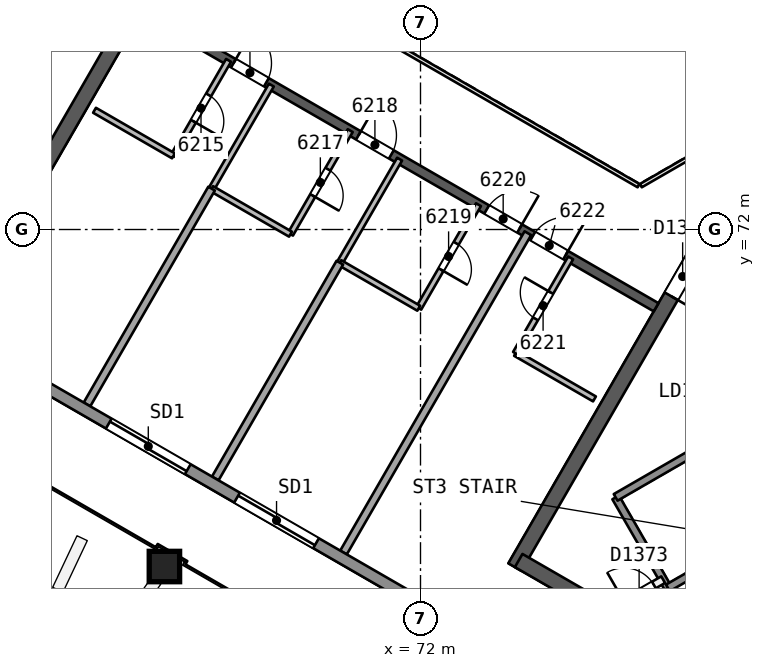
"""IFC4 building model, lengths in metres.
Left out: names, types, materials, properties, quantities, classifications, styles, units other than length and angle.
Written with IfcOpenShell. Run it as: python <this file> out.ifc"""

import sys

from ifc_helpers import new_model, si_unit, direction, frame, frame_2d, origin, origin_2d, place, context, subcontext, project, spatial, rectangle, extrude, element, fill, save


model = new_model("IFC4")
c1 = context("Model", 3, precision=1e-05, world=origin(), true_north=direction((0.0, 1.0)))
c2 = subcontext(c1, "Body", "Model", "MODEL_VIEW")
j1 = project(units=[si_unit("LENGTHUNIT", "METRE"), si_unit("PLANEANGLEUNIT", "RADIAN")], contexts=[c1])
p1 = place(None, origin())
s1 = spatial("IfcSite", under=j1, at=p1, CompositionType="ELEMENT")
p2 = place(p1, origin())
s2 = spatial("IfcBuilding", under=s1, at=p2, CompositionType="ELEMENT")
p3 = place(p2, frame((0.0, 0.0, 255.3)))
s3 = spatial("IfcBuildingStorey", under=s2, at=p3, CompositionType="ELEMENT", Elevation=255.3)
p4 = place(p3, frame((60.737, 71.284, 0.0), z_axis=(0.0, 0.0, 1.0), x_axis=(0.50000547566, 0.866022242388, 0.0)))
e1 = element("IfcWall", 1, at=p4, inside=s3, PredefinedType="SHEAR", context=c2, shape_type="SweptSolid", body=[
    extrude(rectangle(XDim=10.18, YDim=0.4, at=frame_2d((5.09, 0.0))), origin(), (0.0, 0.0, 1.0), 3.7),
])
p5 = place(p4, frame((8.03, 0.0, 0.0)))
e2 = element("IfcOpeningElement", 2, at=p5, cuts=e1, PredefinedType="OPENING", context=c2, shape_type="SweptSolid", body=[
    extrude(rectangle(XDim=1.2, YDim=2.1, at=frame_2d((0.6, 1.05))), frame((0.0, 0.21, 0.0), z_axis=(0.0, -1.0, 0.0), x_axis=(1.0, 0.0, 0.0)), (0.0, 0.0, 1.0), 0.421),
])
p6 = place(p3, frame((79.615, 72.006, 0.0), z_axis=(0.0, 0.0, 1.0), x_axis=(-0.50000177223, -0.866024380585, 0.0)))
e3 = element("IfcWall", 3, at=p6, inside=s3, PredefinedType="SHEAR", context=c2, shape_type="SweptSolid", body=[
    extrude(rectangle(XDim=10.265, YDim=0.4, at=frame_2d((5.132, 0.0))), origin(), (0.0, 0.0, 1.0), 3.7),
])
p7 = place(p6, frame((0.834, 0.0, 0.0)))
e4 = element("IfcOpeningElement", 4, at=p7, cuts=e3, PredefinedType="OPENING", context=c2, shape_type="SweptSolid", body=[
    extrude(rectangle(XDim=1.2, YDim=2.1, at=frame_2d((0.6, 1.05))), frame((0.0, 0.21, 0.0), z_axis=(0.0, -1.0, 0.0), x_axis=(1.0, 0.0, 0.0)), (0.0, 0.0, 1.0), 0.421),
])
p8 = place(p3, frame((74.583, 63.29, 0.0), z_axis=(0.0, 0.0, 1.0), x_axis=(0.866024494188, -0.500001575463, 0.0)))
e5 = element("IfcWall", 5, at=p8, inside=s3, PredefinedType="SHEAR", context=c2, shape_type="SweptSolid", body=[
    extrude(rectangle(XDim=14.133, YDim=0.4, at=frame_2d((7.067, 0.0))), origin(), (0.0, 0.0, 1.0), 3.7),
])
p9 = place(p3, frame((64.7, 77.748, 0.0), z_axis=(0.0, 0.0, 1.0), x_axis=(0.866026492143, -0.499998114903, 0.0)))
e6 = element("IfcWall", 6, at=p9, inside=s3, PredefinedType="SHEAR", context=c2, shape_type="SweptSolid", body=[
    extrude(rectangle(XDim=15.588, YDim=0.25, at=frame_2d((7.794, 0.0))), origin(), (0.0, 0.0, 1.0), 3.3),
])
p10 = place(p9, frame((2.747, 0.0, 0.0)))
e7 = element("IfcOpeningElement", 7, at=p10, cuts=e6, PredefinedType="OPENING", context=c2, shape_type="SweptSolid", body=[
    extrude(rectangle(XDim=1.0, YDim=2.1, at=frame_2d((0.5, 1.05))), frame((0.0, 0.135, 0.0), z_axis=(0.0, -1.0, 0.0), x_axis=(1.0, 0.0, 0.0)), (0.0, 0.0, 1.0), 0.271),
])
p11 = place(p9, frame((6.544, 0.0, 0.0)))
e8 = element("IfcOpeningElement", 8, at=p11, cuts=e6, PredefinedType="OPENING", context=c2, shape_type="SweptSolid", body=[
    extrude(rectangle(XDim=1.0, YDim=2.1, at=frame_2d((0.5, 1.05))), frame((0.0, 0.135, 0.0), z_axis=(0.0, -1.0, 0.0), x_axis=(1.0, 0.0, 0.0)), (0.0, 0.0, 1.0), 0.271),
])
p12 = place(p9, frame((10.441, 0.0, 0.0)))
e9 = element("IfcOpeningElement", 9, at=p12, cuts=e6, PredefinedType="OPENING", context=c2, shape_type="SweptSolid", body=[
    extrude(rectangle(XDim=1.0, YDim=2.1, at=frame_2d((0.5, 1.05))), frame((0.0, 0.135, 0.0), z_axis=(0.0, -1.0, 0.0), x_axis=(1.0, 0.0, 0.0)), (0.0, 0.0, 1.0), 0.271),
])
p13 = place(p9, frame((11.841, 0.0, 0.0)))
e10 = element("IfcOpeningElement", 10, at=p13, cuts=e6, PredefinedType="OPENING", context=c2, shape_type="SweptSolid", body=[
    extrude(rectangle(XDim=1.0, YDim=2.1, at=frame_2d((0.5, 1.05))), frame((0.0, 0.135, 0.0), z_axis=(0.0, -1.0, 0.0), x_axis=(1.0, 0.0, 0.0)), (0.0, 0.0, 1.0), 0.271),
])
p14 = place(p3, frame((65.249, 63.111, 0.0), z_axis=(0.010093620709, 0.017482414954, 0.999796221231), x_axis=(-0.499912926478, -0.865840372083, 0.020187025823)))
e11 = element("IfcColumn", 11, at=p14, inside=s3, PredefinedType="COLUMN", context=c2, shape_type="SweptSolid", body=[
    extrude(rectangle(XDim=0.8, YDim=0.8, at=origin_2d()), origin(), (0.0, 0.0, 1.0), 3.701),
])
p15 = place(p3, frame((66.949, 76.45, 0.0), z_axis=(0.0, 0.0, 1.0), x_axis=(-0.499987231761, -0.866032775405, 0.0)))
e12 = element("IfcWall", 12, at=p15, inside=s3, PredefinedType="PARTITIONING", context=c2, shape_type="SweptSolid", body=[
    extrude(rectangle(XDim=2.9, YDim=0.15, at=frame_2d((1.45, 0.0))), origin(), (0.0, 0.0, 1.0), 3.3),
])
p16 = place(p15, frame((1.05, 0.0, 0.0)))
e13 = element("IfcOpeningElement", 13, at=p16, cuts=e12, PredefinedType="OPENING", context=c2, shape_type="SweptSolid", body=[
    extrude(rectangle(XDim=0.8, YDim=2.1, at=frame_2d((0.4, 1.05))), frame((0.0, 0.085, 0.0), z_axis=(0.0, -1.0, 0.0), x_axis=(1.0, 0.0, 0.0)), (0.0, 0.0, 1.0), 0.171),
])
p17 = place(p3, frame((65.499, 73.938, 0.0), z_axis=(0.0, 0.0, 1.0), x_axis=(-0.866004188936, 0.500036743394, 0.0)))
e14 = element("IfcWall", 14, at=p17, inside=s3, PredefinedType="PARTITIONING", context=c2, shape_type="SweptSolid", body=[
    extrude(rectangle(XDim=2.398, YDim=0.15, at=frame_2d((1.199, 0.0))), origin(), (0.0, 0.0, 1.0), 3.3),
])
p18 = place(p3, frame((63.224, 67.397, 0.0), z_axis=(0.0, 0.0, 1.0), x_axis=(0.499983526171, 0.866034914745, 0.0)))
e15 = element("IfcWall", 15, at=p18, inside=s3, PredefinedType="PARTITIONING", context=c2, shape_type="SweptSolid", body=[
    extrude(rectangle(XDim=6.557, YDim=0.2, at=frame_2d((3.278, 0.0))), origin(), (0.0, 0.0, 1.0), 3.3),
])
p19 = place(p3, frame((66.502, 73.076, 0.0), z_axis=(0.0, 0.0, 1.0), x_axis=(0.499995674689, 0.86602790099, 0.0)))
e16 = element("IfcWall", 16, at=p19, inside=s3, PredefinedType="PARTITIONING", context=c2, shape_type="SweptSolid", body=[
    extrude(rectangle(XDim=3.146, YDim=0.15, at=frame_2d((1.573, 0.0))), origin(), (0.0, 0.0, 1.0), 3.3),
])
p20 = place(p3, frame((70.151, 74.601, 0.0), z_axis=(0.0, 0.0, 1.0), x_axis=(-0.499995674689, -0.86602790099, 0.0)))
e17 = element("IfcWall", 17, at=p20, inside=s3, PredefinedType="PARTITIONING", context=c2, shape_type="SweptSolid", body=[
    extrude(rectangle(XDim=3.146, YDim=0.15, at=frame_2d((1.573, 0.0))), origin(), (0.0, 0.0, 1.0), 3.3),
])
p21 = place(p20, frame((1.173, 0.0, 0.0)))
e18 = element("IfcOpeningElement", 18, at=p21, cuts=e17, PredefinedType="OPENING", context=c2, shape_type="SweptSolid", body=[
    extrude(rectangle(XDim=0.8, YDim=2.1, at=frame_2d((0.4, 1.05))), frame((0.0, 0.085, 0.0), z_axis=(0.0, -1.0, 0.0), x_axis=(1.0, 0.0, 0.0)), (0.0, 0.0, 1.0), 0.171),
])
p22 = place(p3, frame((68.578, 71.877, 0.0), z_axis=(0.0, 0.0, 1.0), x_axis=(-0.866034636017, 0.499984008963, 0.0)))
e19 = element("IfcWall", 19, at=p22, inside=s3, PredefinedType="PARTITIONING", context=c2, shape_type="SweptSolid", body=[
    extrude(rectangle(XDim=2.397, YDim=0.15, at=frame_2d((1.198, 0.0))), origin(), (0.0, 0.0, 1.0), 3.3),
])
p23 = place(p3, frame((66.599, 65.449, 0.0), z_axis=(0.0, 0.0, 1.0), x_axis=(0.499983526171, 0.866034914745, 0.0)))
e20 = element("IfcWall", 20, at=p23, inside=s3, PredefinedType="PARTITIONING", context=c2, shape_type="SweptSolid", body=[
    extrude(rectangle(XDim=6.557, YDim=0.2, at=frame_2d((3.278, 0.0))), origin(), (0.0, 0.0, 1.0), 3.3),
])
p24 = place(p3, frame((69.877, 71.127, 0.0), z_axis=(0.0, 0.0, 1.0), x_axis=(0.499995674689, 0.86602790099, 0.0)))
e21 = element("IfcWall", 21, at=p24, inside=s3, PredefinedType="PARTITIONING", context=c2, shape_type="SweptSolid", body=[
    extrude(rectangle(XDim=3.146, YDim=0.15, at=frame_2d((1.573, 0.0))), origin(), (0.0, 0.0, 1.0), 3.3),
])
p25 = place(p3, frame((73.526, 72.653, 0.0), z_axis=(0.0, 0.0, 1.0), x_axis=(-0.500029284648, -0.866008495625, 0.0)))
e22 = element("IfcWall", 22, at=p25, inside=s3, PredefinedType="PARTITIONING", context=c2, shape_type="SweptSolid", body=[
    extrude(rectangle(XDim=3.145, YDim=0.15, at=frame_2d((1.573, 0.0))), origin(), (0.0, 0.0, 1.0), 3.3),
])
p26 = place(p25, frame((1.173, 0.0, 0.0)))
e23 = element("IfcOpeningElement", 23, at=p26, cuts=e22, PredefinedType="OPENING", context=c2, shape_type="SweptSolid", body=[
    extrude(rectangle(XDim=0.8, YDim=2.1, at=frame_2d((0.4, 1.05))), frame((0.0, 0.085, 0.0), z_axis=(0.0, -1.0, 0.0), x_axis=(1.0, 0.0, 0.0)), (0.0, 0.0, 1.0), 0.171),
])
p27 = place(p3, frame((71.953, 69.929, 0.0), z_axis=(0.0, 0.0, 1.0), x_axis=(-0.866034636017, 0.499984008963, 0.0)))
e24 = element("IfcWall", 24, at=p27, inside=s3, PredefinedType="PARTITIONING", context=c2, shape_type="SweptSolid", body=[
    extrude(rectangle(XDim=2.397, YDim=0.15, at=frame_2d((1.198, 0.0))), origin(), (0.0, 0.0, 1.0), 3.3),
])
p28 = place(p3, frame((69.974, 63.5, 0.0), z_axis=(0.0, 0.0, 1.0), x_axis=(0.499987464755, 0.86603264089, 0.0)))
e25 = element("IfcWall", 25, at=p28, inside=s3, PredefinedType="PARTITIONING", context=c2, shape_type="SweptSolid", body=[
    extrude(rectangle(XDim=9.702, YDim=0.2, at=frame_2d((4.851, 0.0))), origin(), (0.0, 0.0, 1.0), 3.3),
])
p29 = place(p3, frame((76.578, 67.542, 0.0), z_axis=(0.0, 0.0, 1.0), x_axis=(-0.866048270239, 0.499960392047, 0.0)))
e26 = element("IfcWall", 26, at=p29, inside=s3, PredefinedType="PARTITIONING", context=c2, shape_type="SweptSolid", body=[
    extrude(rectangle(XDim=2.398, YDim=0.15, at=frame_2d((1.199, 0.0))), origin(), (0.0, 0.0, 1.0), 3.3),
])
p30 = place(p3, frame((74.501, 68.741, 0.0), z_axis=(0.0, 0.0, 1.0), x_axis=(0.50005036918, 0.865996321171, 0.0)))
e27 = element("IfcWall", 27, at=p30, inside=s3, PredefinedType="PARTITIONING", context=c2, shape_type="SweptSolid", body=[
    extrude(rectangle(XDim=2.9, YDim=0.15, at=frame_2d((1.45, 0.0))), origin(), (0.0, 0.0, 1.0), 3.3),
])
p31 = place(p30, frame((1.05, 0.0, 0.0)))
e28 = element("IfcOpeningElement", 28, at=p31, cuts=e27, PredefinedType="OPENING", context=c2, shape_type="SweptSolid", body=[
    extrude(rectangle(XDim=0.8, YDim=2.1, at=frame_2d((0.4, 1.05))), frame((0.0, 0.085, 0.0), z_axis=(0.0, -1.0, 0.0), x_axis=(1.0, 0.0, 0.0)), (0.0, 0.0, 1.0), 0.171),
])
p32 = place(p3, frame((87.633, 53.133, 0.0), z_axis=(0.0, 0.0, 1.0), x_axis=(-0.866025373204, 0.500000052967, 0.0)))
e29 = element("IfcWall", 29, at=p32, inside=s3, PredefinedType="SOLIDWALL", context=c2, shape_type="SweptSolid", body=[
    extrude(rectangle(XDim=48.748, YDim=0.3, at=frame_2d((24.374, 0.0))), origin(), (0.0, 0.0, 1.0), 3.3),
])
p33 = place(p32, frame((37.353, 0.0, 0.0)))
e30 = element("IfcOpeningElement", 30, at=p33, cuts=e29, PredefinedType="OPENING", context=c2, shape_type="SweptSolid", body=[
    extrude(rectangle(XDim=2.4, YDim=2.4, at=frame_2d((1.2, 1.2))), frame((0.0, 0.161, 0.0), z_axis=(0.0, -1.0, 0.0), x_axis=(1.0, 0.0, 0.0)), (0.0, 0.0, 1.0), 0.321),
])
p34 = place(p32, frame((8.995, 0.0, 0.0)))
e31 = element("IfcOpeningElement", 31, at=p34, cuts=e29, PredefinedType="OPENING", context=c2, shape_type="SweptSolid", body=[
    extrude(rectangle(XDim=2.4, YDim=2.4, at=frame_2d((1.2, 1.2))), frame((0.0, 0.161, 0.0), z_axis=(0.0, -1.0, 0.0), x_axis=(1.0, 0.0, 0.0)), (0.0, 0.0, 1.0), 0.321),
])
p35 = place(p32, frame((25.123, 0.0, 0.0)))
e32 = element("IfcOpeningElement", 32, at=p35, cuts=e29, PredefinedType="OPENING", context=c2, shape_type="SweptSolid", body=[
    extrude(rectangle(XDim=2.4, YDim=2.4, at=frame_2d((1.2, 1.2))), frame((0.0, 0.161, 0.0), z_axis=(0.0, -1.0, 0.0), x_axis=(1.0, 0.0, 0.0)), (0.0, 0.0, 1.0), 0.321),
])
p36 = place(p32, frame((21.226, 0.0, 0.0)))
e33 = element("IfcOpeningElement", 33, at=p36, cuts=e29, PredefinedType="OPENING", context=c2, shape_type="SweptSolid", body=[
    extrude(rectangle(XDim=2.4, YDim=2.4, at=frame_2d((1.2, 1.2))), frame((0.0, 0.161, 0.0), z_axis=(0.0, -1.0, 0.0), x_axis=(1.0, 0.0, 0.0)), (0.0, 0.0, 1.0), 0.321),
])
p37 = place(p3, frame((77.135, 64.952, 0.0), z_axis=(0.0, 0.0, 1.0), x_axis=(0.499996545922, -0.866027397988, 0.0)))
e34 = element("IfcWall", 34, at=p37, inside=s3, PredefinedType="SOLIDWALL", context=c2, shape_type="SweptSolid", body=[
    extrude(rectangle(XDim=2.75, YDim=0.2, at=frame_2d((1.375, 0.0))), origin(), (0.0, 0.0, 1.0), 3.3),
])
p38 = place(p3, frame((77.135, 64.952, 0.0), z_axis=(0.0, 0.0, 1.0), x_axis=(0.866031916153, 0.499988720078, 0.0)))
e35 = element("IfcWall", 35, at=p38, inside=s3, PredefinedType="SOLIDWALL", context=c2, shape_type="SweptSolid", body=[
    extrude(rectangle(XDim=11.35, YDim=0.2, at=frame_2d((5.675, 0.0))), origin(), (0.0, 0.0, 1.0), 3.3),
])
p39 = place(p38, frame((2.875, 0.0, 0.0)))
e36 = element("IfcOpeningElement", 36, at=p39, cuts=e35, PredefinedType="OPENING", context=c2, shape_type="SweptSolid", body=[
    extrude(rectangle(XDim=1.1, YDim=2.1, at=frame_2d((0.55, 1.05))), frame((0.0, 0.11, 0.0), z_axis=(0.0, -1.0, 0.0), x_axis=(1.0, 0.0, 0.0)), (0.0, 0.0, 1.0), 0.221),
])
p40 = place(p38, frame((5.125, 0.0, 0.0)))
e37 = element("IfcOpeningElement", 37, at=p40, cuts=e35, PredefinedType="OPENING", context=c2, shape_type="SweptSolid", body=[
    extrude(rectangle(XDim=1.1, YDim=2.1, at=frame_2d((0.55, 1.05))), frame((0.0, 0.11, 0.0), z_axis=(0.0, -1.0, 0.0), x_axis=(1.0, 0.0, 0.0)), (0.0, 0.0, 1.0), 0.221),
])
p41 = place(p38, frame((7.375, 0.0, 0.0)))
e38 = element("IfcOpeningElement", 38, at=p41, cuts=e35, PredefinedType="OPENING", context=c2, shape_type="SweptSolid", body=[
    extrude(rectangle(XDim=1.1, YDim=2.1, at=frame_2d((0.55, 1.05))), frame((0.0, 0.11, 0.0), z_axis=(0.0, -1.0, 0.0), x_axis=(1.0, 0.0, 0.0)), (0.0, 0.0, 1.0), 0.221),
])
p42 = place(p3, frame((77.12, 62.056, 0.0), z_axis=(0.0, 0.0, 1.0), x_axis=(0.866054810376, 0.49994906283, 0.0)))
e39 = element("IfcWall", 39, at=p42, inside=s3, PredefinedType="PARTITIONING", context=c2, shape_type="SweptSolid", body=[
    extrude(rectangle(XDim=1.461, YDim=0.2, at=frame_2d((0.73, 0.0))), origin(), (0.0, 0.0, 1.0), 3.3),
])
p43 = place(p42, frame((0.281, 0.0, 0.0)))
e40 = element("IfcOpeningElement", 40, at=p43, cuts=e39, PredefinedType="OPENING", context=c2, shape_type="SweptSolid", body=[
    extrude(rectangle(XDim=0.9, YDim=2.1, at=frame_2d((0.45, 1.05))), frame((0.0, 0.11, 0.0), z_axis=(0.0, -1.0, 0.0), x_axis=(1.0, 0.0, 0.0)), (0.0, 0.0, 1.0), 0.221),
])
p44 = place(p3, frame((78.51, 62.57, 0.0), z_axis=(0.0, 0.0, 1.0), x_axis=(0.866053019151, 0.499952165731, 0.0)))
e41 = element("IfcWall", 41, at=p44, inside=s3, PredefinedType="SOLIDWALL", context=c2, shape_type="SweptSolid", body=[
    extrude(rectangle(XDim=2.3, YDim=0.2, at=frame_2d((1.15, 0.0))), origin(), (0.0, 0.0, 1.0), 3.3),
])
p45 = place(p3, frame((67.702, 78.948, 0.0), z_axis=(0.0, 0.0, 1.0), x_axis=(0.866026658274, -0.499997827154, 0.0)))
e42 = element("IfcWall", 42, at=p45, inside=s3, PredefinedType="PARTITIONING", context=c2, shape_type="SweptSolid", body=[
    extrude(rectangle(XDim=11.588, YDim=0.1, at=frame_2d((5.794, 0.0))), origin(), (0.0, 0.0, 1.0), 3.3),
])
p46 = place(p3, frame((77.798, 73.154, 0.0), z_axis=(0.0, 0.0, 1.0), x_axis=(0.866041268327, 0.499972520799, 0.0)))
e43 = element("IfcWall", 43, at=p46, inside=s3, PredefinedType="PARTITIONING", context=c2, shape_type="SweptSolid", body=[
    extrude(rectangle(XDim=2.0, YDim=0.1, at=frame_2d((1.0, 0.0))), origin(), (0.0, 0.0, 1.0), 3.3),
])
p47 = place(p16, origin())
e44 = element("IfcDoor", 44, at=p47, inside=s3, OperationType="SINGLE_SWING_RIGHT", PredefinedType="NOTDEFINED", context=c2, shape_type="SweptSolid", body=[
    extrude(rectangle(XDim=0.8, YDim=2.1, at=frame_2d((0.4, 1.05))), frame((0.0, 0.025, 0.0), z_axis=(0.0, -1.0, 0.0), x_axis=(1.0, 0.0, 0.0)), (0.0, 0.0, 1.0), 0.05),
])
fill(e13, e44)
p48 = place(p10, origin())
e45 = element("IfcDoor", 45, at=p48, inside=s3, OperationType="SINGLE_SWING_LEFT", PredefinedType="NOTDEFINED", context=c2, shape_type="SweptSolid", body=[
    extrude(rectangle(XDim=1.0, YDim=2.1, at=frame_2d((0.5, 1.05))), frame((0.0, 0.025, 0.0), z_axis=(0.0, -1.0, 0.0), x_axis=(1.0, 0.0, 0.0)), (0.0, 0.0, 1.0), 0.05),
])
fill(e7, e45)
p49 = place(p21, origin())
e46 = element("IfcDoor", 46, at=p49, inside=s3, OperationType="SINGLE_SWING_RIGHT", PredefinedType="NOTDEFINED", context=c2, shape_type="SweptSolid", body=[
    extrude(rectangle(XDim=0.8, YDim=2.1, at=frame_2d((0.4, 1.05))), frame((0.0, 0.025, 0.0), z_axis=(0.0, -1.0, 0.0), x_axis=(1.0, 0.0, 0.0)), (0.0, 0.0, 1.0), 0.05),
])
fill(e18, e46)
p50 = place(p11, origin())
e47 = element("IfcDoor", 47, at=p50, inside=s3, OperationType="SINGLE_SWING_LEFT", PredefinedType="NOTDEFINED", context=c2, shape_type="SweptSolid", body=[
    extrude(rectangle(XDim=1.0, YDim=2.1, at=frame_2d((0.5, 1.05))), frame((0.0, 0.025, 0.0), z_axis=(0.0, -1.0, 0.0), x_axis=(1.0, 0.0, 0.0)), (0.0, 0.0, 1.0), 0.05),
])
fill(e8, e47)
p51 = place(p26, origin())
e48 = element("IfcDoor", 48, at=p51, inside=s3, OperationType="SINGLE_SWING_RIGHT", PredefinedType="NOTDEFINED", context=c2, shape_type="SweptSolid", body=[
    extrude(rectangle(XDim=0.8, YDim=2.1, at=frame_2d((0.4, 1.05))), frame((0.0, 0.025, 0.0), z_axis=(0.0, -1.0, 0.0), x_axis=(1.0, 0.0, 0.0)), (0.0, 0.0, 1.0), 0.05),
])
fill(e23, e48)
p52 = place(p12, origin())
e49 = element("IfcDoor", 49, at=p52, inside=s3, OperationType="SINGLE_SWING_RIGHT", PredefinedType="NOTDEFINED", context=c2, shape_type="SweptSolid", body=[
    extrude(rectangle(XDim=1.0, YDim=2.1, at=frame_2d((0.5, 1.05))), frame((0.0, 0.025, 0.0), z_axis=(0.0, -1.0, 0.0), x_axis=(1.0, 0.0, 0.0)), (0.0, 0.0, 1.0), 0.05),
])
fill(e9, e49)
p53 = place(p31, origin())
e50 = element("IfcDoor", 50, at=p53, inside=s3, OperationType="SINGLE_SWING_RIGHT", PredefinedType="NOTDEFINED", context=c2, shape_type="SweptSolid", body=[
    extrude(rectangle(XDim=0.8, YDim=2.1, at=frame_2d((0.4, 1.05))), frame((0.0, 0.025, 0.0), z_axis=(0.0, -1.0, 0.0), x_axis=(1.0, 0.0, 0.0)), (0.0, 0.0, 1.0), 0.05),
])
fill(e28, e50)
p54 = place(p13, origin())
e51 = element("IfcDoor", 51, at=p54, inside=s3, OperationType="SINGLE_SWING_RIGHT", PredefinedType="NOTDEFINED", context=c2, shape_type="SweptSolid", body=[
    extrude(rectangle(XDim=1.0, YDim=2.1, at=frame_2d((0.5, 1.05))), frame((0.0, 0.025, 0.0), z_axis=(0.0, -1.0, 0.0), x_axis=(1.0, 0.0, 0.0)), (0.0, 0.0, 1.0), 0.05),
])
fill(e10, e51)
p55 = place(p35, origin())
e52 = element("IfcDoor", 52, at=p55, inside=s3, OperationType="SLIDING_TO_LEFT", PredefinedType="NOTDEFINED", context=c2, shape_type="SweptSolid", body=[
    extrude(rectangle(XDim=2.4, YDim=2.4, at=frame_2d((1.2, 1.2))), frame((0.0, 0.025, 0.0), z_axis=(0.0, -1.0, 0.0), x_axis=(1.0, 0.0, 0.0)), (0.0, 0.0, 1.0), 0.05),
])
fill(e32, e52)
p56 = place(p36, origin())
e53 = element("IfcDoor", 53, at=p56, inside=s3, OperationType="SLIDING_TO_RIGHT", PredefinedType="NOTDEFINED", context=c2, shape_type="SweptSolid", body=[
    extrude(rectangle(XDim=2.4, YDim=2.4, at=frame_2d((1.2, 1.2))), frame((0.0, 0.025, 0.0), z_axis=(0.0, -1.0, 0.0), x_axis=(1.0, 0.0, 0.0)), (0.0, 0.0, 1.0), 0.05),
])
fill(e33, e53)
p57 = place(p7, origin())
e54 = element("IfcDoor", 54, at=p57, inside=s3, OperationType="SINGLE_SWING_RIGHT", PredefinedType="NOTDEFINED", context=c2, shape_type="SweptSolid", body=[
    extrude(rectangle(XDim=1.2, YDim=2.1, at=frame_2d((0.6, 1.05))), frame((0.0, 0.025, 0.0), z_axis=(0.0, -1.0, 0.0), x_axis=(1.0, 0.0, 0.0)), (0.0, 0.0, 1.0), 0.05),
])
fill(e4, e54)
p58 = place(p43, origin())
e55 = element("IfcDoor", 55, at=p58, inside=s3, OperationType="SINGLE_SWING_LEFT", PredefinedType="NOTDEFINED", context=c2, shape_type="SweptSolid", body=[
    extrude(rectangle(XDim=0.9, YDim=2.1, at=frame_2d((0.45, 1.05))), frame((0.0, 0.025, 0.0), z_axis=(0.0, -1.0, 0.0), x_axis=(1.0, 0.0, 0.0)), (0.0, 0.0, 1.0), 0.05),
])
fill(e40, e55)
save(model, sys.argv[1])
